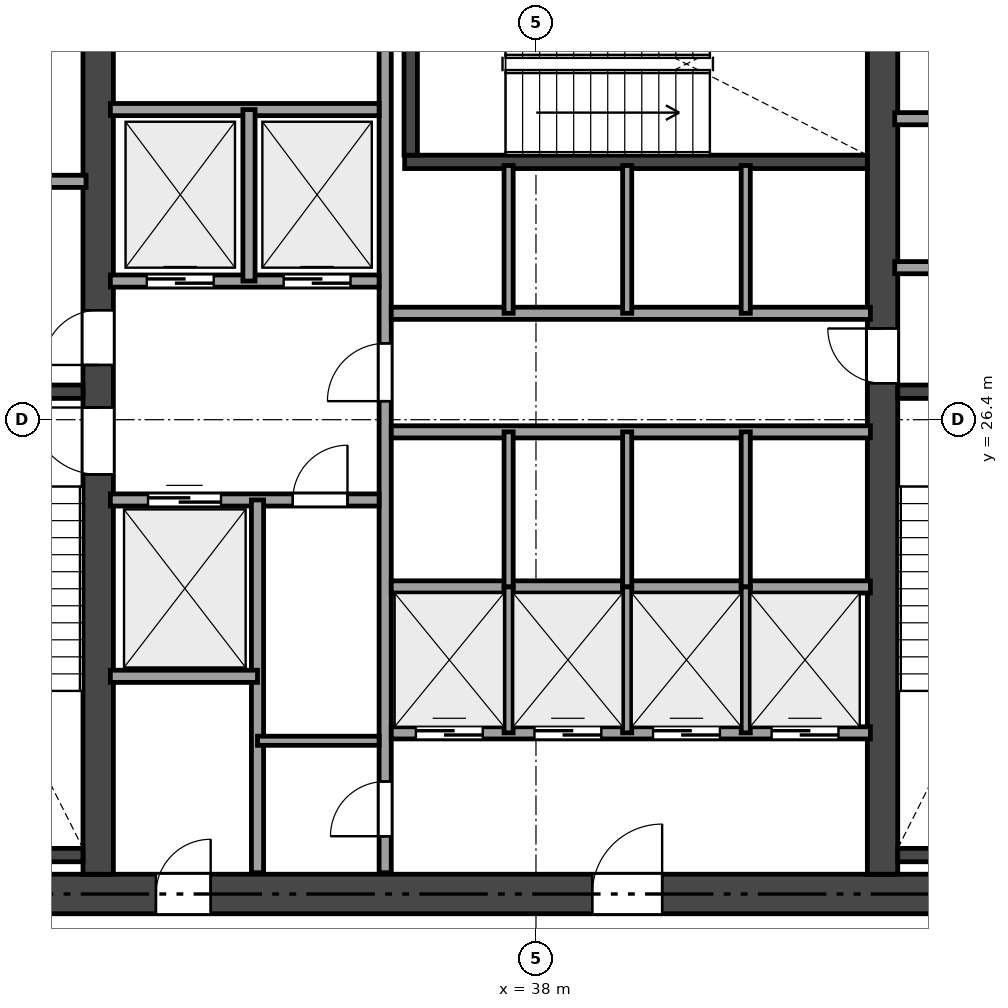
"""IFC4 building model, lengths in metres.
Left out: names, types, materials, properties, quantities, classifications, styles, units other than length and angle.
Written with IfcOpenShell. Run it as: python <this file> out.ifc"""

import sys

from ifc_helpers import new_model, si_unit, direction, frame, frame_2d, origin, place, context, subcontext, project, spatial, rectangle, extrude, element, fill, save


model = new_model("IFC4")
c1 = context("Model", 3, precision=1e-05, world=origin(), true_north=direction((0.0, 1.0)))
c2 = subcontext(c1, "Body", "Model", "MODEL_VIEW")
j1 = project(units=[si_unit("LENGTHUNIT", "METRE"), si_unit("PLANEANGLEUNIT", "RADIAN")], contexts=[c1])
p1 = place(None, origin())
s1 = spatial("IfcSite", under=j1, at=p1, CompositionType="ELEMENT")
p2 = place(p1, origin())
s2 = spatial("IfcBuilding", under=s1, at=p2, CompositionType="ELEMENT")
p3 = place(p2, frame((0.0, 0.0, 71.85)))
s3 = spatial("IfcBuildingStorey", under=s2, at=p3, CompositionType="ELEMENT", Elevation=71.85)
p4 = place(p3, frame((26.475, 18.6, 0.0), z_axis=(0.0, 0.0, 1.0), x_axis=(1.0, 0.0, 0.0)))
e1 = element("IfcWall", 1, at=p4, inside=s3, PredefinedType="SHEAR", context=c2, shape_type="SweptSolid", body=[
    extrude(rectangle(XDim=21.45, YDim=0.65, at=frame_2d((10.725, 0.0))), origin(), (0.0, 0.0, 1.0), 4.08),
])
p5 = place(p4, frame((12.45, 0.0, 0.0)))
e2 = element("IfcOpeningElement", 2, at=p5, cuts=e1, PredefinedType="OPENING", context=c2, shape_type="SweptSolid", body=[
    extrude(rectangle(XDim=1.15, YDim=2.15, at=frame_2d((0.575, 1.075))), frame((0.0, 0.335, 0.0), z_axis=(0.0, -1.0, 0.0), x_axis=(1.0, 0.0, 0.0)), (0.0, 0.0, 1.0), 0.67),
])
p6 = place(p4, frame((5.275, 0.0, 0.0)))
e3 = element("IfcOpeningElement", 3, at=p6, cuts=e1, PredefinedType="OPENING", context=c2, shape_type="SweptSolid", body=[
    extrude(rectangle(XDim=0.9, YDim=2.1, at=frame_2d((0.45, 1.05))), frame((0.0, 0.335, 0.0), z_axis=(0.0, -1.0, 0.0), x_axis=(1.0, 0.0, 0.0)), (0.0, 0.0, 1.0), 0.67),
])
p7 = place(p3, frame((30.8, 18.925, 0.0), z_axis=(0.0, 0.0, 1.0), x_axis=(0.0, 1.0, 0.0)))
e4 = element("IfcWall", 4, at=p7, inside=s3, PredefinedType="SHEAR", context=c2, shape_type="SweptSolid", body=[
    extrude(rectangle(XDim=14.95, YDim=0.5, at=frame_2d((7.475, 0.0))), origin(), (0.0, 0.0, 1.0), 4.08),
])
p8 = place(p7, frame((6.575, 0.0, 0.0)))
e5 = element("IfcOpeningElement", 5, at=p8, cuts=e4, PredefinedType="OPENING", context=c2, shape_type="SweptSolid", body=[
    extrude(rectangle(XDim=1.1, YDim=2.15, at=frame_2d((0.55, 1.075))), frame((0.0, 0.26, 0.0), z_axis=(0.0, -1.0, 0.0), x_axis=(1.0, 0.0, 0.0)), (0.0, 0.0, 1.0), 0.52),
])
p9 = place(p7, frame((8.375, 0.0, 0.0)))
e6 = element("IfcOpeningElement", 6, at=p9, cuts=e4, PredefinedType="OPENING", context=c2, shape_type="SweptSolid", body=[
    extrude(rectangle(XDim=0.9, YDim=2.1, at=frame_2d((0.45, 1.05))), frame((0.0, 0.26, 0.0), z_axis=(0.0, -1.0, 0.0), x_axis=(1.0, 0.0, 0.0)), (0.0, 0.0, 1.0), 0.52),
])
p10 = place(p3, frame((43.7, 18.925, 0.0), z_axis=(0.0, 0.0, 1.0), x_axis=(0.0, 1.0, 0.0)))
e7 = element("IfcWall", 7, at=p10, inside=s3, PredefinedType="SHEAR", context=c2, shape_type="SweptSolid", body=[
    extrude(rectangle(XDim=14.95, YDim=0.5, at=frame_2d((7.475, 0.0))), origin(), (0.0, 0.0, 1.0), 4.08),
])
p11 = place(p10, frame((8.075, 0.0, 0.0)))
e8 = element("IfcOpeningElement", 8, at=p11, cuts=e7, PredefinedType="OPENING", context=c2, shape_type="SweptSolid", body=[
    extrude(rectangle(XDim=0.9, YDim=2.1, at=frame_2d((0.45, 1.05))), frame((0.0, 0.26, 0.0), z_axis=(0.0, -1.0, 0.0), x_axis=(1.0, 0.0, 0.0)), (0.0, 0.0, 1.0), 0.52),
])
for number, where, z_axis, x_axis in (
    (9, (27.125, 26.86, 0.0), (0.0, 0.0, 1.0), (1.0, 0.0, 0.0)),
    (10, (27.125, 19.24, 0.0), (0.0, 0.0, 1.0), (1.0, 0.0, 0.0)),
):
    element("IfcWall", number, at=place(p3, frame(where, z_axis=z_axis, x_axis=x_axis)), inside=s3, PredefinedType="SHEAR", context=c2, shape_type="SweptSolid", body=[
        extrude(rectangle(XDim=3.425, YDim=0.22, at=frame_2d((1.712, 0.0))), origin(), (0.0, 0.0, 1.0), 4.08),
    ])
for number, where, z_axis, x_axis in (
    (11, (43.95, 26.86, 0.0), (0.0, 0.0, 1.0), (1.0, 0.0, 0.0)),
    (12, (43.95, 19.24, 0.0), (0.0, 0.0, 1.0), (1.0, 0.0, 0.0)),
):
    element("IfcWall", number, at=place(p3, frame(where, z_axis=z_axis, x_axis=x_axis)), inside=s3, PredefinedType="SHEAR", context=c2, shape_type="SweptSolid", body=[
        extrude(rectangle(XDim=3.325, YDim=0.22, at=frame_2d((1.663, 0.0))), origin(), (0.0, 0.0, 1.0), 4.08),
    ])
p12 = place(p3, frame((35.84, 30.64, 0.0), z_axis=(0.0, 0.0, 1.0), x_axis=(1.0, 0.0, 0.0)))
e13 = element("IfcWall", 13, at=p12, inside=s3, PredefinedType="SHEAR", context=c2, shape_type="SweptSolid", body=[
    extrude(rectangle(XDim=7.61, YDim=0.22, at=frame_2d((3.805, 0.0))), origin(), (0.0, 0.0, 1.0), 4.08),
])
p13 = place(p3, frame((35.94, 30.75, 0.0), z_axis=(0.0, 0.0, 1.0), x_axis=(0.0, 1.0, 0.0)))
e14 = element("IfcWall", 14, at=p13, inside=s3, PredefinedType="SHEAR", context=c2, shape_type="SweptSolid", body=[
    extrude(rectangle(XDim=3.125, YDim=0.22, at=frame_2d((1.562, 0.0))), origin(), (0.0, 0.0, 1.0), 4.08),
])
p14 = place(p3, frame((27.15, 30.32, 0.0), z_axis=(0.0, 0.0, 1.0), x_axis=(1.0, 0.0, 0.0)))
e15 = element("IfcWall", 15, at=p14, inside=s3, PredefinedType="SOLIDWALL", context=c2, shape_type="SweptSolid", body=[
    extrude(rectangle(XDim=3.45, YDim=0.2, at=frame_2d((1.725, 0.0))), origin(), (0.0, 0.0, 1.0), 4.08),
])
p15 = place(p3, frame((43.9, 28.9, 0.0), z_axis=(0.0, 0.0, 1.0), x_axis=(1.0, 0.0, 0.0)))
e16 = element("IfcWall", 16, at=p15, inside=s3, PredefinedType="SOLIDWALL", context=c2, shape_type="SweptSolid", body=[
    extrude(rectangle(XDim=3.35, YDim=0.2, at=frame_2d((1.675, 0.0))), origin(), (0.0, 0.0, 1.0), 4.08),
])
p16 = place(p15, frame((1.15, 0.0, 0.0)))
e17 = element("IfcOpeningElement", 17, at=p16, cuts=e16, PredefinedType="OPENING", context=c2, shape_type="SweptSolid", body=[
    extrude(rectangle(XDim=0.9, YDim=2.1, at=frame_2d((0.45, 1.05))), frame((0.0, 0.11, 0.0), z_axis=(0.0, -1.0, 0.0), x_axis=(1.0, 0.0, 0.0)), (0.0, 0.0, 1.0), 0.22),
])
p17 = place(p3, frame((43.9, 31.35, 0.0), z_axis=(0.0, 0.0, 1.0), x_axis=(1.0, 0.0, 0.0)))
e18 = element("IfcWall", 18, at=p17, inside=s3, PredefinedType="SOLIDWALL", context=c2, shape_type="SweptSolid", body=[
    extrude(rectangle(XDim=3.35, YDim=0.2, at=frame_2d((1.675, 0.0))), origin(), (0.0, 0.0, 1.0), 4.08),
])
p18 = place(p3, frame((35.52, 18.95, 0.0), z_axis=(0.0, 0.0, 1.0), x_axis=(0.0, 1.0, 0.0)))
e19 = element("IfcWall", 19, at=p18, inside=s3, PredefinedType="SOLIDWALL", context=c2, shape_type="SweptSolid", body=[
    extrude(rectangle(XDim=14.9, YDim=0.2, at=frame_2d((7.45, 0.0))), origin(), (0.0, 0.0, 1.0), 3.601),
])
p19 = place(p18, frame((7.755, 0.0, 0.0)))
e20 = element("IfcOpeningElement", 20, at=p19, cuts=e19, PredefinedType="OPENING", context=c2, shape_type="SweptSolid", body=[
    extrude(rectangle(XDim=0.95, YDim=2.15, at=frame_2d((0.475, 1.075))), frame((0.0, 0.11, 0.0), z_axis=(0.0, -1.0, 0.0), x_axis=(1.0, 0.0, 0.0)), (0.0, 0.0, 1.0), 0.22),
])
p20 = place(p18, frame((0.6, 0.0, 0.0)))
e21 = element("IfcOpeningElement", 21, at=p20, cuts=e19, PredefinedType="OPENING", context=c2, shape_type="SweptSolid", body=[
    extrude(rectangle(XDim=0.9, YDim=2.1, at=frame_2d((0.45, 1.05))), frame((0.0, 0.11, 0.0), z_axis=(0.0, -1.0, 0.0), x_axis=(1.0, 0.0, 0.0)), (0.0, 0.0, 1.0), 0.22),
])
p21 = place(p3, frame((31.0, 28.68, 0.0), z_axis=(0.0, 0.0, 1.0), x_axis=(1.0, 0.0, 0.0)))
e22 = element("IfcWall", 22, at=p21, inside=s3, PredefinedType="SOLIDWALL", context=c2, shape_type="SweptSolid", body=[
    extrude(rectangle(XDim=4.42, YDim=0.2, at=frame_2d((2.21, 0.0))), origin(), (0.0, 0.0, 1.0), 4.08),
])
p22 = place(p21, frame((0.6, 0.0, 0.0)))
e23 = element("IfcOpeningElement", 23, at=p22, cuts=e22, PredefinedType="OPENING", context=c2, shape_type="SweptSolid", body=[
    extrude(rectangle(XDim=1.1, YDim=2.15, at=frame_2d((0.55, 1.075))), frame((0.0, 0.11, 0.0), z_axis=(0.0, -1.0, 0.0), x_axis=(1.0, 0.0, 0.0)), (0.0, 0.0, 1.0), 0.22),
])
p23 = place(p21, frame((2.85, 0.0, 0.0)))
e24 = element("IfcOpeningElement", 24, at=p23, cuts=e22, PredefinedType="OPENING", context=c2, shape_type="SweptSolid", body=[
    extrude(rectangle(XDim=1.1, YDim=2.15, at=frame_2d((0.55, 1.075))), frame((0.0, 0.11, 0.0), z_axis=(0.0, -1.0, 0.0), x_axis=(1.0, 0.0, 0.0)), (0.0, 0.0, 1.0), 0.22),
])
p24 = place(p3, frame((31.0, 31.5, 0.0), z_axis=(0.0, 0.0, 1.0), x_axis=(1.0, 0.0, 0.0)))
e25 = element("IfcWall", 25, at=p24, inside=s3, PredefinedType="SOLIDWALL", context=c2, shape_type="SweptSolid", body=[
    extrude(rectangle(XDim=4.42, YDim=0.2, at=frame_2d((2.21, 0.0))), origin(), (0.0, 0.0, 1.0), 4.08),
])
p25 = place(p3, frame((33.28, 28.68, 0.0), z_axis=(0.0, 0.0, 1.0), x_axis=(0.0, 1.0, 0.0)))
e26 = element("IfcWall", 26, at=p25, inside=s3, PredefinedType="SOLIDWALL", context=c2, shape_type="SweptSolid", body=[
    extrude(rectangle(XDim=2.82, YDim=0.2, at=frame_2d((1.41, 0.0))), origin(), (0.0, 0.0, 1.0), 4.08),
])
p26 = place(p3, frame((31.0, 25.08, 0.0), z_axis=(0.0, 0.0, 1.0), x_axis=(1.0, 0.0, 0.0)))
e27 = element("IfcWall", 27, at=p26, inside=s3, PredefinedType="SOLIDWALL", context=c2, shape_type="SweptSolid", body=[
    extrude(rectangle(XDim=4.42, YDim=0.2, at=frame_2d((2.21, 0.0))), origin(), (0.0, 0.0, 1.0), 4.08),
])
p27 = place(p26, frame((3.0, 0.0, 0.0)))
e28 = element("IfcOpeningElement", 28, at=p27, cuts=e27, PredefinedType="OPENING", context=c2, shape_type="SweptSolid", body=[
    extrude(rectangle(XDim=0.9, YDim=2.1, at=frame_2d((0.45, 1.05))), frame((0.0, 0.11, 0.0), z_axis=(0.0, -1.0, 0.0), x_axis=(1.0, 0.0, 0.0)), (0.0, 0.0, 1.0), 0.22),
])
p28 = place(p26, frame((0.62, 0.0, 0.0)))
e29 = element("IfcOpeningElement", 29, at=p28, cuts=e27, PredefinedType="OPENING", context=c2, shape_type="SweptSolid", body=[
    extrude(rectangle(XDim=1.2, YDim=2.15, at=frame_2d((0.6, 1.075))), frame((0.0, 0.11, 0.0), z_axis=(0.0, -1.0, 0.0), x_axis=(1.0, 0.0, 0.0)), (0.0, 0.0, 1.0), 0.22),
])
p29 = place(p3, frame((33.42, 18.95, 0.0), z_axis=(0.0, 0.0, 1.0), x_axis=(0.0, 1.0, 0.0)))
e30 = element("IfcWall", 30, at=p29, inside=s3, PredefinedType="SOLIDWALL", context=c2, shape_type="SweptSolid", body=[
    extrude(rectangle(XDim=6.13, YDim=0.2, at=frame_2d((3.065, 0.0))), origin(), (0.0, 0.0, 1.0), 3.601),
])
p30 = place(p3, frame((31.0, 22.18, 0.0), z_axis=(0.0, 0.0, 1.0), x_axis=(1.0, 0.0, 0.0)))
e31 = element("IfcWall", 31, at=p30, inside=s3, PredefinedType="SOLIDWALL", context=c2, shape_type="SweptSolid", body=[
    extrude(rectangle(XDim=2.42, YDim=0.2, at=frame_2d((1.21, 0.0))), origin(), (0.0, 0.0, 1.0), 4.08),
])
p31 = place(p3, frame((33.42, 21.12, 0.0), z_axis=(0.0, 0.0, 1.0), x_axis=(1.0, 0.0, 0.0)))
e32 = element("IfcWall", 32, at=p31, inside=s3, PredefinedType="PARTITIONING", context=c2, shape_type="SweptSolid", body=[
    extrude(rectangle(XDim=2.0, YDim=0.15, at=frame_2d((1.0, 0.0))), origin(), (0.0, 0.0, 1.0), 4.08),
])
for number, where, z_axis, x_axis in (
    (33, (35.62, 28.15, 0.0), (0.0, 0.0, 1.0), (1.0, 0.0, 0.0)),
    (34, (35.62, 26.2, 0.0), (0.0, 0.0, 1.0), (1.0, 0.0, 0.0)),
):
    element("IfcWall", number, at=place(p3, frame(where, z_axis=z_axis, x_axis=x_axis)), inside=s3, PredefinedType="SOLIDWALL", context=c2, shape_type="SweptSolid", body=[
        extrude(rectangle(XDim=7.88, YDim=0.2, at=frame_2d((3.94, 0.0))), origin(), (0.0, 0.0, 1.0), 4.08),
    ])
p32 = place(p3, frame((35.62, 23.65, 0.0), z_axis=(0.0, 0.0, 1.0), x_axis=(1.0, 0.0, 0.0)))
e35 = element("IfcWall", 35, at=p32, inside=s3, PredefinedType="SOLIDWALL", context=c2, shape_type="SweptSolid", body=[
    extrude(rectangle(XDim=7.88, YDim=0.2, at=frame_2d((3.94, 0.0))), origin(), (0.0, 0.0, 1.0), 3.601),
])
p33 = place(p3, frame((35.62, 21.25, 0.0), z_axis=(0.0, 0.0, 1.0), x_axis=(1.0, 0.0, 0.0)))
e36 = element("IfcWall", 36, at=p33, inside=s3, PredefinedType="SOLIDWALL", context=c2, shape_type="SweptSolid", body=[
    extrude(rectangle(XDim=7.88, YDim=0.2, at=frame_2d((3.94, 0.0))), origin(), (0.0, 0.0, 1.0), 4.08),
])
p34 = place(p33, frame((0.405, 0.0, 0.0)))
e37 = element("IfcOpeningElement", 37, at=p34, cuts=e36, PredefinedType="OPENING", context=c2, shape_type="SweptSolid", body=[
    extrude(rectangle(XDim=1.1, YDim=2.15, at=frame_2d((0.55, 1.075))), frame((0.0, 0.11, 0.0), z_axis=(0.0, -1.0, 0.0), x_axis=(1.0, 0.0, 0.0)), (0.0, 0.0, 1.0), 0.22),
])
p35 = place(p33, frame((2.355, 0.0, 0.0)))
e38 = element("IfcOpeningElement", 38, at=p35, cuts=e36, PredefinedType="OPENING", context=c2, shape_type="SweptSolid", body=[
    extrude(rectangle(XDim=1.1, YDim=2.15, at=frame_2d((0.55, 1.075))), frame((0.0, 0.11, 0.0), z_axis=(0.0, -1.0, 0.0), x_axis=(1.0, 0.0, 0.0)), (0.0, 0.0, 1.0), 0.22),
])
p36 = place(p33, frame((4.305, 0.0, 0.0)))
e39 = element("IfcOpeningElement", 39, at=p36, cuts=e36, PredefinedType="OPENING", context=c2, shape_type="SweptSolid", body=[
    extrude(rectangle(XDim=1.1, YDim=2.15, at=frame_2d((0.55, 1.075))), frame((0.0, 0.11, 0.0), z_axis=(0.0, -1.0, 0.0), x_axis=(1.0, 0.0, 0.0)), (0.0, 0.0, 1.0), 0.22),
])
p37 = place(p33, frame((6.255, 0.0, 0.0)))
e40 = element("IfcOpeningElement", 40, at=p37, cuts=e36, PredefinedType="OPENING", context=c2, shape_type="SweptSolid", body=[
    extrude(rectangle(XDim=1.1, YDim=2.15, at=frame_2d((0.55, 1.075))), frame((0.0, 0.11, 0.0), z_axis=(0.0, -1.0, 0.0), x_axis=(1.0, 0.0, 0.0)), (0.0, 0.0, 1.0), 0.22),
])
for number, where, z_axis, x_axis in (
    (41, (37.55, 28.15, 0.0), (0.0, 0.0, 1.0), (0.0, 1.0, 0.0)),
    (42, (39.5, 28.15, 0.0), (0.0, 0.0, 1.0), (0.0, 1.0, 0.0)),
    (43, (41.45, 28.15, 0.0), (0.0, 0.0, 1.0), (0.0, 1.0, 0.0)),
):
    element("IfcWall", number, at=place(p3, frame(where, z_axis=z_axis, x_axis=x_axis)), inside=s3, PredefinedType="PARTITIONING", context=c2, shape_type="SweptSolid", body=[
        extrude(rectangle(XDim=2.43, YDim=0.15, at=frame_2d((1.215, 0.0))), origin(), (0.0, 0.0, 1.0), 4.08),
    ])
for number, where, z_axis, x_axis in (
    (44, (37.55, 23.65, 0.0), (0.0, 0.0, 1.0), (0.0, 1.0, 0.0)),
    (45, (39.5, 23.65, 0.0), (0.0, 0.0, 1.0), (0.0, 1.0, 0.0)),
    (46, (41.45, 23.65, 0.0), (0.0, 0.0, 1.0), (0.0, 1.0, 0.0)),
):
    element("IfcWall", number, at=place(p3, frame(where, z_axis=z_axis, x_axis=x_axis)), inside=s3, PredefinedType="PARTITIONING", context=c2, shape_type="SweptSolid", body=[
        extrude(rectangle(XDim=2.55, YDim=0.15, at=frame_2d((1.275, 0.0))), origin(), (0.0, 0.0, 1.0), 3.601),
    ])
for number, where, z_axis, x_axis in (
    (47, (37.55, 21.25, 0.0), (0.0, 0.0, 1.0), (0.0, 1.0, 0.0)),
    (48, (39.5, 21.25, 0.0), (0.0, 0.0, 1.0), (0.0, 1.0, 0.0)),
    (49, (41.45, 21.25, 0.0), (0.0, 0.0, 1.0), (0.0, 1.0, 0.0)),
):
    element("IfcWall", number, at=place(p3, frame(where, z_axis=z_axis, x_axis=x_axis)), inside=s3, PredefinedType="PARTITIONING", context=c2, shape_type="SweptSolid", body=[
        extrude(rectangle(XDim=2.4, YDim=0.15, at=frame_2d((1.2, 0.0))), origin(), (0.0, 0.0, 1.0), 3.601),
    ])
p38 = place(p8, origin())
e50 = element("IfcDoor", 50, at=p38, inside=s3, OperationType="SINGLE_SWING_RIGHT", PredefinedType="DOOR", context=c2, shape_type="SweptSolid", body=[
    extrude(rectangle(XDim=1.1, YDim=2.15, at=frame_2d((0.55, 1.075))), frame((0.0, 0.025, 0.0), z_axis=(0.0, -1.0, 0.0), x_axis=(1.0, 0.0, 0.0)), (0.0, 0.0, 1.0), 0.05),
])
fill(e5, e50)
p39 = place(p19, origin())
e51 = element("IfcDoor", 51, at=p39, inside=s3, OperationType="SINGLE_SWING_LEFT", PredefinedType="DOOR", context=c2, shape_type="SweptSolid", body=[
    extrude(rectangle(XDim=0.95, YDim=2.15, at=frame_2d((0.475, 1.075))), frame((0.0, 0.025, 0.0), z_axis=(0.0, -1.0, 0.0), x_axis=(1.0, 0.0, 0.0)), (0.0, 0.0, 1.0), 0.05),
])
fill(e20, e51)
p40 = place(p11, origin())
e52 = element("IfcDoor", 52, at=p40, inside=s3, OperationType="SINGLE_SWING_RIGHT", PredefinedType="DOOR", context=c2, shape_type="SweptSolid", body=[
    extrude(rectangle(XDim=0.9, YDim=2.1, at=frame_2d((0.45, 1.05))), frame((0.0, 0.025, 0.0), z_axis=(0.0, -1.0, 0.0), x_axis=(1.0, 0.0, 0.0)), (0.0, 0.0, 1.0), 0.05),
])
fill(e8, e52)
p41 = place(p5, origin())
e53 = element("IfcDoor", 53, at=p41, inside=s3, OperationType="SINGLE_SWING_RIGHT", PredefinedType="DOOR", context=c2, shape_type="SweptSolid", body=[
    extrude(rectangle(XDim=1.15, YDim=2.15, at=frame_2d((0.575, 1.075))), frame((0.0, 0.025, 0.0), z_axis=(0.0, -1.0, 0.0), x_axis=(1.0, 0.0, 0.0)), (0.0, 0.0, 1.0), 0.05),
])
fill(e2, e53)
p42 = place(p9, origin())
e54 = element("IfcDoor", 54, at=p42, inside=s3, OperationType="SINGLE_SWING_LEFT", PredefinedType="DOOR", context=c2, shape_type="SweptSolid", body=[
    extrude(rectangle(XDim=0.9, YDim=2.1, at=frame_2d((0.45, 1.05))), frame((0.0, 0.025, 0.0), z_axis=(0.0, -1.0, 0.0), x_axis=(1.0, 0.0, 0.0)), (0.0, 0.0, 1.0), 0.05),
])
fill(e6, e54)
p43 = place(p6, origin())
e55 = element("IfcDoor", 55, at=p43, inside=s3, OperationType="SINGLE_SWING_RIGHT", PredefinedType="DOOR", context=c2, shape_type="SweptSolid", body=[
    extrude(rectangle(XDim=0.9, YDim=2.1, at=frame_2d((0.45, 1.05))), frame((0.0, 0.025, 0.0), z_axis=(0.0, -1.0, 0.0), x_axis=(1.0, 0.0, 0.0)), (0.0, 0.0, 1.0), 0.05),
])
fill(e3, e55)
p44 = place(p20, origin())
e56 = element("IfcDoor", 56, at=p44, inside=s3, OperationType="SINGLE_SWING_LEFT", PredefinedType="DOOR", context=c2, shape_type="SweptSolid", body=[
    extrude(rectangle(XDim=0.9, YDim=2.1, at=frame_2d((0.45, 1.05))), frame((0.0, 0.025, 0.0), z_axis=(0.0, -1.0, 0.0), x_axis=(1.0, 0.0, 0.0)), (0.0, 0.0, 1.0), 0.05),
])
fill(e21, e56)
p45 = place(p27, origin())
e57 = element("IfcDoor", 57, at=p45, inside=s3, OperationType="SINGLE_SWING_RIGHT", PredefinedType="DOOR", context=c2, shape_type="SweptSolid", body=[
    extrude(rectangle(XDim=0.9, YDim=2.1, at=frame_2d((0.45, 1.05))), frame((0.0, 0.025, 0.0), z_axis=(0.0, -1.0, 0.0), x_axis=(1.0, 0.0, 0.0)), (0.0, 0.0, 1.0), 0.05),
])
fill(e28, e57)
p46 = place(p22, origin())
e58 = element("IfcDoor", 58, at=p46, inside=s3, OperationType="SLIDING_TO_LEFT", PredefinedType="DOOR", context=c2, shape_type="SweptSolid", body=[
    extrude(rectangle(XDim=1.1, YDim=2.15, at=frame_2d((0.55, 1.075))), frame((0.0, 0.025, 0.0), z_axis=(0.0, -1.0, 0.0), x_axis=(1.0, 0.0, 0.0)), (0.0, 0.0, 1.0), 0.05),
])
fill(e23, e58)
p47 = place(p23, origin())
e59 = element("IfcDoor", 59, at=p47, inside=s3, OperationType="SLIDING_TO_LEFT", PredefinedType="DOOR", context=c2, shape_type="SweptSolid", body=[
    extrude(rectangle(XDim=1.1, YDim=2.15, at=frame_2d((0.55, 1.075))), frame((0.0, 0.025, 0.0), z_axis=(0.0, -1.0, 0.0), x_axis=(1.0, 0.0, 0.0)), (0.0, 0.0, 1.0), 0.05),
])
fill(e24, e59)
p48 = place(p28, origin())
e60 = element("IfcDoor", 60, at=p48, inside=s3, OperationType="SLIDING_TO_LEFT", PredefinedType="DOOR", context=c2, shape_type="SweptSolid", body=[
    extrude(rectangle(XDim=1.2, YDim=2.15, at=frame_2d((0.6, 1.075))), frame((0.0, 0.025, 0.0), z_axis=(0.0, -1.0, 0.0), x_axis=(1.0, 0.0, 0.0)), (0.0, 0.0, 1.0), 0.05),
])
fill(e29, e60)
p49 = place(p34, origin())
e61 = element("IfcDoor", 61, at=p49, inside=s3, OperationType="SLIDING_TO_LEFT", PredefinedType="DOOR", context=c2, shape_type="SweptSolid", body=[
    extrude(rectangle(XDim=1.1, YDim=2.15, at=frame_2d((0.55, 1.075))), frame((0.0, 0.025, 0.0), z_axis=(0.0, -1.0, 0.0), x_axis=(1.0, 0.0, 0.0)), (0.0, 0.0, 1.0), 0.05),
])
fill(e37, e61)
p50 = place(p35, origin())
e62 = element("IfcDoor", 62, at=p50, inside=s3, OperationType="SLIDING_TO_LEFT", PredefinedType="DOOR", context=c2, shape_type="SweptSolid", body=[
    extrude(rectangle(XDim=1.1, YDim=2.15, at=frame_2d((0.55, 1.075))), frame((0.0, 0.025, 0.0), z_axis=(0.0, -1.0, 0.0), x_axis=(1.0, 0.0, 0.0)), (0.0, 0.0, 1.0), 0.05),
])
fill(e38, e62)
p51 = place(p36, origin())
e63 = element("IfcDoor", 63, at=p51, inside=s3, OperationType="SLIDING_TO_LEFT", PredefinedType="DOOR", context=c2, shape_type="SweptSolid", body=[
    extrude(rectangle(XDim=1.1, YDim=2.15, at=frame_2d((0.55, 1.075))), frame((0.0, 0.025, 0.0), z_axis=(0.0, -1.0, 0.0), x_axis=(1.0, 0.0, 0.0)), (0.0, 0.0, 1.0), 0.05),
])
fill(e39, e63)
p52 = place(p37, origin())
e64 = element("IfcDoor", 64, at=p52, inside=s3, OperationType="SLIDING_TO_LEFT", PredefinedType="DOOR", context=c2, shape_type="SweptSolid", body=[
    extrude(rectangle(XDim=1.1, YDim=2.15, at=frame_2d((0.55, 1.075))), frame((0.0, 0.025, 0.0), z_axis=(0.0, -1.0, 0.0), x_axis=(1.0, 0.0, 0.0)), (0.0, 0.0, 1.0), 0.05),
])
fill(e40, e64)
save(model, sys.argv[1])
